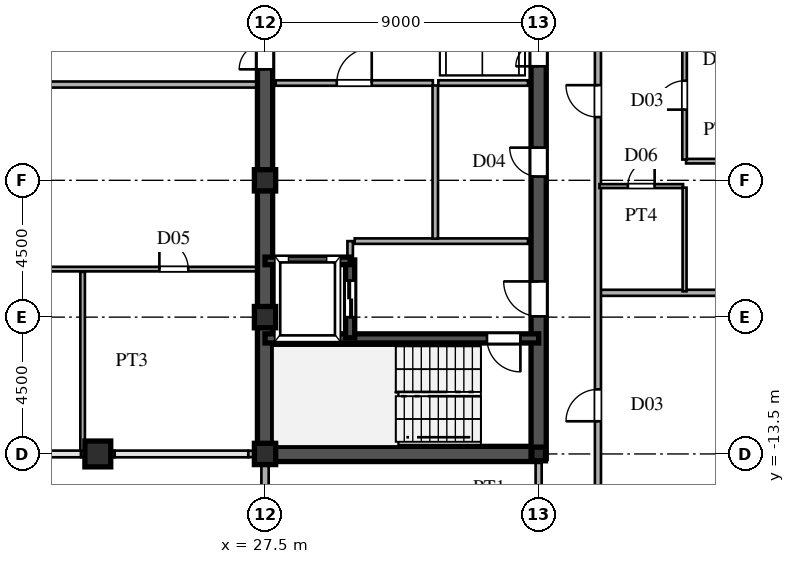
"""IFC4 building model, lengths in metres.
Left out: names, types, materials, properties, quantities, classifications, styles, units other than length and angle.
Written with IfcOpenShell. Run it as: python <this file> out.ifc"""

import sys

from ifc_helpers import new_model, si_unit, direction, frame, frame_2d, origin, origin_2d, place, context, subcontext, project, spatial, rectangle, hollow_rectangle, i_section, extrude, source, transform, mapped, element, fill, save


model = new_model("IFC4")
c1 = context("Model", 3, precision=1e-05, world=origin(), true_north=direction((0.0, 1.0)))
c2 = subcontext(c1, "Body", "Model", "MODEL_VIEW")
j1 = project(units=[si_unit("LENGTHUNIT", "METRE"), si_unit("PLANEANGLEUNIT", "RADIAN")], contexts=[c1])
p1 = place(None, origin())
s1 = spatial("IfcSite", under=j1, at=p1, CompositionType="ELEMENT")
p2 = place(p1, origin())
s2 = spatial("IfcBuilding", under=s1, at=p2, CompositionType="ELEMENT")
p3 = place(p2, frame((0.0, 0.0, 246.9)))
s3 = spatial("IfcBuildingStorey", under=s2, at=p3, CompositionType="ELEMENT", Elevation=246.9)
m1 = source(origin(), c2, "Body", "SweptSolid", [
    extrude(hollow_rectangle(XDim=0.7, YDim=0.7, WallThickness=0.03, at=origin_2d()), origin(), (0.0, 0.0, 1.0), 3.75),
])
for number, where, z_axis, x_axis in (
    (1, (27.5, -13.5, 0.0), (0.0, 0.0, 1.0), (1.0, 0.0, 0.0)),
    (2, (27.5, -9.0, 0.0), (0.0, 0.0, 1.0), (1.0, 0.0, 0.0)),
    (3, (27.5, -4.5, 0.0), (0.0, 0.0, 1.0), (1.0, 0.0, 0.0)),
):
    element("IfcColumn", number, at=place(p3, frame(where, z_axis=z_axis, x_axis=x_axis)), inside=s3, PredefinedType="COLUMN", context=c2, shape_type="MappedRepresentation", body=[
        mapped(m1, transform((0.0, 0.0, 0.0), scale=1.0)),
    ])
m2 = source(origin(), c2, "Body", "SweptSolid", [
    extrude(i_section(OverallWidth=0.45, OverallDepth=0.45, WebThickness=0.016, FlangeThickness=0.025, at=origin_2d()), origin(), (0.0, 0.0, 1.0), 3.75),
])
p4 = place(p3, frame((36.5, -13.5, 0.0), z_axis=(0.0, 0.0, 1.0), x_axis=(1.0, 0.0, 0.0)))
e4 = element("IfcColumn", 4, at=p4, inside=s3, PredefinedType="COLUMN", context=c2, shape_type="MappedRepresentation", body=[
    mapped(m2, transform((0.0, 0.0, 0.0), scale=1.0)),
])
m3 = source(origin(), c2, "Body", "SweptSolid", [
    extrude(hollow_rectangle(XDim=0.85, YDim=0.85, WallThickness=0.036, at=origin_2d()), origin(), (0.0, 0.0, 1.0), 3.75),
])
p5 = place(p3, frame((22.0, -13.5, 0.0), z_axis=(0.0, 0.0, 1.0), x_axis=(1.0, 0.0, 0.0)))
e5 = element("IfcColumn", 5, at=p5, inside=s3, PredefinedType="COLUMN", context=c2, shape_type="MappedRepresentation", body=[
    mapped(m3, transform((0.0, 0.0, 0.0), scale=1.0)),
])
p6 = place(p3, frame((27.5, -15.98, 0.0), z_axis=(0.0, 0.0, 1.0), x_axis=(0.0, 1.0, 0.0)))
e6 = element("IfcWall", 6, at=p6, inside=s3, PredefinedType="SOLIDWALL", context=c2, shape_type="SweptSolid", body=[
    extrude(rectangle(XDim=1.605, YDim=0.24, at=frame_2d((0.803, 0.0))), origin(), (0.0, 0.0, 1.0), 3.53),
])
p7 = place(p3, frame((27.5, -14.375, 0.0), z_axis=(0.0, 0.0, 1.0), x_axis=(0.0, 1.0, 0.0)))
e7 = element("IfcWall", 7, at=p7, inside=s3, PredefinedType="SOLIDWALL", context=c2, shape_type="SweptSolid", body=[
    extrude(rectangle(XDim=0.62, YDim=0.24, at=frame_2d((0.31, 0.0))), origin(), (0.0, 0.0, 1.0), 3.03),
])
p8 = place(p3, frame((21.45, -13.5, 0.0), z_axis=(0.0, 0.0, 1.0), x_axis=(1.0, 0.0, 0.0)))
e8 = element("IfcWall", 8, at=p8, inside=s3, PredefinedType="SOLIDWALL", context=c2, shape_type="SweptSolid", body=[
    extrude(rectangle(XDim=1.1, YDim=0.21, at=frame_2d((0.55, 0.0))), origin(), (0.0, 0.0, 1.0), 3.03),
])
p9 = place(p3, frame((26.95, -13.5, 0.0), z_axis=(0.0, 0.0, 1.0), x_axis=(1.0, 0.0, 0.0)))
e9 = element("IfcWall", 9, at=p9, inside=s3, PredefinedType="SOLIDWALL", context=c2, shape_type="SweptSolid", body=[
    extrude(rectangle(XDim=0.54, YDim=0.21, at=frame_2d((0.27, 0.0))), origin(), (0.0, 0.0, 1.0), 3.03),
])
p10 = place(p3, frame((27.5, -13.5, 0.0), z_axis=(0.0, 0.0, 1.0), x_axis=(0.0, 1.0, 0.0)))
e10 = element("IfcWall", 10, at=p10, inside=s3, PredefinedType="SHEAR", context=c2, shape_type="SweptSolid", body=[
    extrude(rectangle(XDim=12.2, YDim=0.5, at=frame_2d((6.1, 0.0))), origin(), (0.0, 0.0, 1.0), 3.53),
])
p11 = place(p3, frame((27.5, -1.3, 0.0), z_axis=(0.0, 0.0, 1.0), x_axis=(0.0, 1.0, 0.0)))
e11 = element("IfcWall", 11, at=p11, inside=s3, PredefinedType="SHEAR", context=c2, shape_type="SweptSolid", body=[
    extrude(rectangle(XDim=2.6, YDim=0.5, at=frame_2d((1.3, 0.0))), origin(), (0.0, 0.0, 1.0), 3.53),
])
p12 = place(p11, frame((0.45, 0.0, 0.0)))
e12 = element("IfcOpeningElement", 12, at=p12, cuts=e11, PredefinedType="OPENING", context=c2, shape_type="SweptSolid", body=[
    extrude(rectangle(XDim=1.7, YDim=2.35, at=frame_2d((0.85, 1.175))), frame((0.0, 0.26, 0.0), z_axis=(0.0, -1.0, 0.0), x_axis=(1.0, 0.0, 0.0)), (0.0, 0.0, 1.0), 0.52),
])
p13 = place(p3, frame((27.5, -13.5, 0.0), z_axis=(0.0, 0.0, 1.0), x_axis=(1.0, 0.0, 0.0)))
e13 = element("IfcWall", 13, at=p13, inside=s3, PredefinedType="SHEAR", context=c2, shape_type="SweptSolid", body=[
    extrude(rectangle(XDim=9.0, YDim=0.5, at=frame_2d((4.5, 0.0))), origin(), (0.0, 0.0, 1.0), 3.53),
])
p14 = place(p3, frame((36.5, -13.65, 0.0), z_axis=(0.0, 0.0, 1.0), x_axis=(0.0, 1.0, 0.0)))
e14 = element("IfcWall", 14, at=p14, inside=s3, PredefinedType="SHEAR", context=c2, shape_type="SweptSolid", body=[
    extrude(rectangle(XDim=7.15, YDim=0.5, at=frame_2d((3.575, 0.0))), origin(), (0.0, 0.0, 1.0), 3.53),
])
p15 = place(p14, frame((4.675, 0.0, 0.0)))
e15 = element("IfcOpeningElement", 15, at=p15, cuts=e14, PredefinedType="OPENING", context=c2, shape_type="SweptSolid", body=[
    extrude(rectangle(XDim=1.15, YDim=2.2, at=frame_2d((0.575, 1.1))), frame((0.0, 0.26, 0.0), z_axis=(0.0, -1.0, 0.0), x_axis=(1.0, 0.0, 0.0)), (0.0, 0.0, 1.0), 0.52),
])
p16 = place(p3, frame((36.5, -1.3, 0.0), z_axis=(0.0, 0.0, 1.0), x_axis=(0.0, 1.0, 0.0)))
e16 = element("IfcWall", 16, at=p16, inside=s3, PredefinedType="SHEAR", context=c2, shape_type="SweptSolid", body=[
    extrude(rectangle(XDim=2.6, YDim=0.5, at=frame_2d((1.3, 0.0))), origin(), (0.0, 0.0, 1.0), 3.53),
])
p17 = place(p16, frame((0.55, 0.0, 0.0)))
e17 = element("IfcOpeningElement", 17, at=p17, cuts=e16, PredefinedType="OPENING", context=c2, shape_type="SweptSolid", body=[
    extrude(rectangle(XDim=1.5, YDim=2.3, at=frame_2d((0.75, 1.15))), frame((0.0, 0.26, 0.0), z_axis=(0.0, -1.0, 0.0), x_axis=(1.0, 0.0, 0.0)), (0.0, 0.0, 1.0), 0.52),
])
p18 = place(p3, frame((36.5, -6.5, 0.0), z_axis=(0.0, 0.0, 1.0), x_axis=(0.0, 1.0, 0.0)))
e18 = element("IfcWall", 18, at=p18, inside=s3, PredefinedType="SHEAR", context=c2, shape_type="SweptSolid", body=[
    extrude(rectangle(XDim=5.2, YDim=0.5, at=frame_2d((2.6, 0.0))), origin(), (0.0, 0.0, 1.0), 3.53),
])
p19 = place(p18, frame((2.125, 0.0, 0.0)))
e19 = element("IfcOpeningElement", 19, at=p19, cuts=e18, PredefinedType="OPENING", context=c2, shape_type="SweptSolid", body=[
    extrude(rectangle(XDim=0.95, YDim=2.15, at=frame_2d((0.475, 1.075))), frame((0.0, 0.26, 0.0), z_axis=(0.0, -1.0, 0.0), x_axis=(1.0, 0.0, 0.0)), (0.0, 0.0, 1.0), 0.52),
])
p20 = place(p3, frame((27.5, -9.7, 0.0), z_axis=(0.0, 0.0, 1.0), x_axis=(1.0, 0.0, 0.0)))
e20 = element("IfcWall", 20, at=p20, inside=s3, PredefinedType="SHEAR", context=c2, shape_type="SweptSolid", body=[
    extrude(rectangle(XDim=9.0, YDim=0.3, at=frame_2d((4.5, 0.0))), origin(), (0.0, 0.0, 1.0), 3.53),
])
p21 = place(p20, frame((7.3, 0.0, 0.0)))
e21 = element("IfcOpeningElement", 21, at=p21, cuts=e20, PredefinedType="OPENING", context=c2, shape_type="SweptSolid", body=[
    extrude(rectangle(XDim=1.1, YDim=2.2, at=frame_2d((0.55, 1.1))), frame((0.0, 0.16, 0.0), z_axis=(0.0, -1.0, 0.0), x_axis=(1.0, 0.0, 0.0)), (0.0, 0.0, 1.0), 0.32),
])
p22 = place(p3, frame((27.5, -7.15, 0.0), z_axis=(0.0, 0.0, 1.0), x_axis=(1.0, 0.0, 0.0)))
e22 = element("IfcWall", 22, at=p22, inside=s3, PredefinedType="SHEAR", context=c2, shape_type="SweptSolid", body=[
    extrude(rectangle(XDim=2.8, YDim=0.25, at=frame_2d((1.4, 0.0))), origin(), (0.0, 0.0, 1.0), 3.53),
])
p23 = place(p3, frame((30.3, -9.68, 0.0), z_axis=(0.0, 0.0, 1.0), x_axis=(0.0, 1.0, 0.0)))
e23 = element("IfcWall", 23, at=p23, inside=s3, PredefinedType="SHEAR", context=c2, shape_type="SweptSolid", body=[
    extrude(rectangle(XDim=2.56, YDim=0.3, at=frame_2d((1.28, 0.0))), origin(), (0.0, 0.0, 1.0), 3.53),
])
p24 = place(p23, frame((0.68, 0.0, 0.0)))
e24 = element("IfcOpeningElement", 24, at=p24, cuts=e23, PredefinedType="OPENING", context=c2, shape_type="SweptSolid", body=[
    extrude(rectangle(XDim=1.2, YDim=2.25, at=frame_2d((0.6, 1.125))), frame((0.0, 0.16, 0.0), z_axis=(0.0, -1.0, 0.0), x_axis=(1.0, 0.0, 0.0)), (0.0, 0.0, 1.0), 0.32),
])
p25 = place(p3, frame((30.45, -6.5, 0.0), z_axis=(0.0, 0.0, 1.0), x_axis=(1.0, 0.0, 0.0)))
e25 = element("IfcWall", 25, at=p25, inside=s3, PredefinedType="PARTITIONING", context=c2, shape_type="SweptSolid", body=[
    extrude(rectangle(XDim=5.7, YDim=0.18, at=frame_2d((2.85, 0.0))), origin(), (0.0, 0.0, 1.0), 3.53),
])
p26 = place(p3, frame((30.3, -7.12, 0.0), z_axis=(0.0, 0.0, 1.0), x_axis=(0.0, 1.0, 0.0)))
e26 = element("IfcWall", 26, at=p26, inside=s3, PredefinedType="PARTITIONING", context=c2, shape_type="SweptSolid", body=[
    extrude(rectangle(XDim=0.62, YDim=0.18, at=frame_2d((0.31, 0.0))), origin(), (0.0, 0.0, 1.0), 3.53),
])
p27 = place(p3, frame((33.1, -6.42, 0.0), z_axis=(0.0, 0.0, 1.0), x_axis=(0.0, 1.0, 0.0)))
e27 = element("IfcWall", 27, at=p27, inside=s3, PredefinedType="PARTITIONING", context=c2, shape_type="SweptSolid", body=[
    extrude(rectangle(XDim=5.04, YDim=0.18, at=frame_2d((2.52, 0.0))), origin(), (0.0, 0.0, 1.0), 3.53),
])
p28 = place(p3, frame((27.85, -1.3, 0.0), z_axis=(0.0, 0.0, 1.0), x_axis=(1.0, 0.0, 0.0)))
e28 = element("IfcWall", 28, at=p28, inside=s3, PredefinedType="PARTITIONING", context=c2, shape_type="SweptSolid", body=[
    extrude(rectangle(XDim=5.17, YDim=0.18, at=frame_2d((2.585, 0.0))), origin(), (0.0, 0.0, 1.0), 3.53),
])
p29 = place(p28, frame((2.01, 0.0, 0.0)))
e29 = element("IfcOpeningElement", 29, at=p29, cuts=e28, PredefinedType="OPENING", context=c2, shape_type="SweptSolid", body=[
    extrude(rectangle(XDim=1.15, YDim=2.2, at=frame_2d((0.575, 1.1))), frame((0.0, 0.1, 0.0), z_axis=(0.0, -1.0, 0.0), x_axis=(1.0, 0.0, 0.0)), (0.0, 0.0, 1.0), 0.2),
])
p30 = place(p3, frame((33.2, -1.3, 0.0), z_axis=(0.0, 0.0, 1.0), x_axis=(1.0, 0.0, 0.0)))
e30 = element("IfcWall", 30, at=p30, inside=s3, PredefinedType="PARTITIONING", context=c2, shape_type="SweptSolid", body=[
    extrude(rectangle(XDim=2.95, YDim=0.18, at=frame_2d((1.475, 0.0))), origin(), (0.0, 0.0, 1.0), 3.53),
])
p31 = place(p3, frame((38.53, -8.2, 0.0), z_axis=(0.0, 0.0, 1.0), x_axis=(1.0, 0.0, 0.0)))
e31 = element("IfcWall", 31, at=p31, inside=s3, PredefinedType="PARTITIONING", context=c2, shape_type="SweptSolid", body=[
    extrude(rectangle(XDim=17.813, YDim=0.2, at=frame_2d((8.906, 0.0))), origin(), (0.0, 0.0, 1.0), 3.53),
])
p32 = place(p3, frame((7.085, -7.42, 0.0), z_axis=(0.0, 0.0, 1.0), x_axis=(1.0, 0.0, 0.0)))
e32 = element("IfcWall", 32, at=p32, inside=s3, PredefinedType="PARTITIONING", context=c2, shape_type="SweptSolid", body=[
    extrude(rectangle(XDim=20.16, YDim=0.15, at=frame_2d((10.08, 0.0))), origin(), (0.0, 0.0, 1.0), 3.53),
])
p33 = place(p32, frame((3.44, 0.0, 0.0)))
e33 = element("IfcOpeningElement", 33, at=p33, cuts=e32, PredefinedType="OPENING", context=c2, shape_type="SweptSolid", body=[
    extrude(rectangle(XDim=0.95, YDim=2.15, at=frame_2d((0.475, 1.075))), frame((0.0, 0.085, 0.0), z_axis=(0.0, -1.0, 0.0), x_axis=(1.0, 0.0, 0.0)), (0.0, 0.0, 1.0), 0.17),
])
p34 = place(p32, frame((10.69, 0.0, 0.0)))
e34 = element("IfcOpeningElement", 34, at=p34, cuts=e32, PredefinedType="OPENING", context=c2, shape_type="SweptSolid", body=[
    extrude(rectangle(XDim=0.95, YDim=2.15, at=frame_2d((0.475, 1.075))), frame((0.0, 0.085, 0.0), z_axis=(0.0, -1.0, 0.0), x_axis=(1.0, 0.0, 0.0)), (0.0, 0.0, 1.0), 0.17),
])
p35 = place(p32, frame((16.94, 0.0, 0.0)))
e35 = element("IfcOpeningElement", 35, at=p35, cuts=e32, PredefinedType="OPENING", context=c2, shape_type="SweptSolid", body=[
    extrude(rectangle(XDim=0.95, YDim=2.15, at=frame_2d((0.475, 1.075))), frame((0.0, 0.085, 0.0), z_axis=(0.0, -1.0, 0.0), x_axis=(1.0, 0.0, 0.0)), (0.0, 0.0, 1.0), 0.17),
])
p36 = place(p3, frame((38.5, -4.69, 0.0), z_axis=(0.0, 0.0, 1.0), x_axis=(1.0, 0.0, 0.0)))
e36 = element("IfcWall", 36, at=p36, inside=s3, PredefinedType="PARTITIONING", context=c2, shape_type="SweptSolid", body=[
    extrude(rectangle(XDim=2.75, YDim=0.13, at=frame_2d((1.375, 0.0))), origin(), (0.0, 0.0, 1.0), 3.53),
])
p37 = place(p36, frame((0.935, 0.0, 0.0)))
e37 = element("IfcOpeningElement", 37, at=p37, cuts=e36, PredefinedType="OPENING", context=c2, shape_type="SweptSolid", body=[
    extrude(rectangle(XDim=0.88, YDim=2.1, at=frame_2d((0.44, 1.05))), frame((0.0, 0.075, 0.0), z_axis=(0.0, -1.0, 0.0), x_axis=(1.0, 0.0, 0.0)), (0.0, 0.0, 1.0), 0.15),
])
p38 = place(p3, frame((41.35, -3.87, 0.0), z_axis=(0.0, 0.0, 1.0), x_axis=(1.0, 0.0, 0.0)))
e38 = element("IfcWall", 38, at=p38, inside=s3, PredefinedType="PARTITIONING", context=c2, shape_type="SweptSolid", body=[
    extrude(rectangle(XDim=22.24, YDim=0.15, at=frame_2d((11.12, 0.0))), origin(), (0.0, 0.0, 1.0), 3.53),
])
p39 = place(p38, frame((2.775, 0.0, 0.0)))
e39 = element("IfcOpeningElement", 39, at=p39, cuts=e38, PredefinedType="OPENING", context=c2, shape_type="SweptSolid", body=[
    extrude(rectangle(XDim=0.95, YDim=2.15, at=frame_2d((0.475, 1.075))), frame((0.0, 0.085, 0.0), z_axis=(0.0, -1.0, 0.0), x_axis=(1.0, 0.0, 0.0)), (0.0, 0.0, 1.0), 0.17),
])
p40 = place(p3, frame((-27.245, -1.35, 0.0), z_axis=(0.0, 0.0, 1.0), x_axis=(1.0, 0.0, 0.0)))
e40 = element("IfcWall", 40, at=p40, inside=s3, PredefinedType="PARTITIONING", context=c2, shape_type="SweptSolid", body=[
    extrude(rectangle(XDim=54.49, YDim=0.2, at=frame_2d((27.245, 0.0))), origin(), (0.0, 0.0, 1.0), 3.53),
])
p41 = place(p40, frame((24.97, 0.0, 0.0)))
e41 = element("IfcOpeningElement", 41, at=p41, cuts=e40, PredefinedType="OPENING", context=c2, shape_type="SweptSolid", body=[
    extrude(rectangle(XDim=1.05, YDim=2.25, at=frame_2d((0.525, 1.125))), frame((0.0, 0.11, 0.0), z_axis=(0.0, -1.0, 0.0), x_axis=(1.0, 0.0, 0.0)), (0.0, 0.0, 1.0), 0.22),
])
p42 = place(p3, frame((21.5, -13.39, 0.0), z_axis=(0.0, 0.0, 1.0), x_axis=(0.0, 1.0, 0.0)))
e42 = element("IfcWall", 42, at=p42, inside=s3, PredefinedType="PARTITIONING", context=c2, shape_type="SweptSolid", body=[
    extrude(rectangle(XDim=5.88, YDim=0.15, at=frame_2d((2.94, 0.0))), origin(), (0.0, 0.0, 1.0), 3.53),
])
p43 = place(p3, frame((36.5, -15.515, 0.0), z_axis=(0.0, 0.0, 1.0), x_axis=(0.0, 1.0, 0.0)))
e43 = element("IfcWall", 43, at=p43, inside=s3, PredefinedType="PARTITIONING", context=c2, shape_type="SweptSolid", body=[
    extrude(rectangle(XDim=1.76, YDim=0.2, at=frame_2d((0.88, 0.0))), origin(), (0.0, 0.0, 1.0), 2.93),
])
p44 = place(p3, frame((38.45, -15.515, 0.0), z_axis=(0.0, 0.0, 1.0), x_axis=(0.0, 1.0, 0.0)))
e44 = element("IfcWall", 44, at=p44, inside=s3, PredefinedType="PARTITIONING", context=c2, shape_type="SweptSolid", body=[
    extrude(rectangle(XDim=31.03, YDim=0.2, at=frame_2d((15.515, 0.0))), origin(), (0.0, 0.0, 1.0), 3.53),
])
p45 = place(p44, frame((3.09, 0.0, 0.0)))
e45 = element("IfcOpeningElement", 45, at=p45, cuts=e44, PredefinedType="OPENING", context=c2, shape_type="SweptSolid", body=[
    extrude(rectangle(XDim=1.05, YDim=2.25, at=frame_2d((0.525, 1.125))), frame((0.0, 0.11, 0.0), z_axis=(0.0, -1.0, 0.0), x_axis=(1.0, 0.0, 0.0)), (0.0, 0.0, 1.0), 0.22),
])
p46 = place(p44, frame((13.095, 0.0, 0.0)))
e46 = element("IfcOpeningElement", 46, at=p46, cuts=e44, PredefinedType="OPENING", context=c2, shape_type="SweptSolid", body=[
    extrude(rectangle(XDim=1.05, YDim=2.25, at=frame_2d((0.525, 1.125))), frame((0.0, 0.11, 0.0), z_axis=(0.0, -1.0, 0.0), x_axis=(1.0, 0.0, 0.0)), (0.0, 0.0, 1.0), 0.22),
])
p47 = place(p44, frame((25.19, 0.0, 0.0)))
e47 = element("IfcOpeningElement", 47, at=p47, cuts=e44, PredefinedType="OPENING", context=c2, shape_type="SweptSolid", body=[
    extrude(rectangle(XDim=1.05, YDim=2.25, at=frame_2d((0.525, 1.125))), frame((0.0, 0.11, 0.0), z_axis=(0.0, -1.0, 0.0), x_axis=(1.0, 0.0, 0.0)), (0.0, 0.0, 1.0), 0.22),
])
p48 = place(p3, frame((41.3, -8.15, 0.0), z_axis=(0.0, 0.0, 1.0), x_axis=(0.0, 1.0, 0.0)))
e48 = element("IfcWall", 48, at=p48, inside=s3, PredefinedType="PARTITIONING", context=c2, shape_type="SweptSolid", body=[
    extrude(rectangle(XDim=3.408, YDim=0.13, at=frame_2d((1.704, 0.0))), origin(), (0.0, 0.0, 1.0), 3.53),
])
p49 = place(p3, frame((41.3, -3.817, 0.0), z_axis=(0.0, 0.0, 1.0), x_axis=(0.0, 1.0, 0.0)))
e49 = element("IfcWall", 49, at=p49, inside=s3, PredefinedType="PARTITIONING", context=c2, shape_type="SweptSolid", body=[
    extrude(rectangle(XDim=4.234, YDim=0.15, at=frame_2d((2.117, 0.0))), origin(), (0.0, 0.0, 1.0), 3.53),
])
p50 = place(p49, frame((1.642, 0.0, 0.0)))
e50 = element("IfcOpeningElement", 50, at=p50, cuts=e49, PredefinedType="OPENING", context=c2, shape_type="SweptSolid", body=[
    extrude(rectangle(XDim=0.95, YDim=2.15, at=frame_2d((0.475, 1.075))), frame((0.0, 0.085, 0.0), z_axis=(0.0, -1.0, 0.0), x_axis=(1.0, 0.0, 0.0)), (0.0, 0.0, 1.0), 0.17),
])
m4 = source(origin(), c2, "Body", "SweptSolid", [
    extrude(rectangle(XDim=1.7, YDim=2.35, at=frame_2d((0.85, 1.175))), frame((0.0, 0.025, 0.0), z_axis=(0.0, -1.0, 0.0), x_axis=(1.0, 0.0, 0.0)), (0.0, 0.0, 1.0), 0.05),
])
p51 = place(p12, origin())
e51 = element("IfcDoor", 51, at=p51, inside=s3, OperationType="DOUBLE_SWING_LEFT", PredefinedType="DOOR", context=c2, shape_type="MappedRepresentation", body=[
    mapped(m4, transform((0.0, 0.0, 0.0), scale=1.0)),
])
fill(e12, e51)
m5 = source(origin(), c2, "Body", "SweptSolid", [
    extrude(rectangle(XDim=1.15, YDim=2.2, at=frame_2d((0.575, 1.1))), frame((0.0, 0.025, 0.0), z_axis=(0.0, -1.0, 0.0), x_axis=(1.0, 0.0, 0.0)), (0.0, 0.0, 1.0), 0.05),
])
p52 = place(p15, origin())
e52 = element("IfcDoor", 52, at=p52, inside=s3, OperationType="SINGLE_SWING_RIGHT", PredefinedType="DOOR", context=c2, shape_type="MappedRepresentation", body=[
    mapped(m5, transform((0.0, 0.0, 0.0), scale=1.0)),
])
fill(e15, e52)
m6 = source(origin(), c2, "Body", "SweptSolid", [
    extrude(rectangle(XDim=1.5, YDim=2.3, at=frame_2d((0.75, 1.15))), frame((0.0, 0.025, 0.0), z_axis=(0.0, -1.0, 0.0), x_axis=(1.0, 0.0, 0.0)), (0.0, 0.0, 1.0), 0.05),
])
p53 = place(p17, origin())
e53 = element("IfcDoor", 53, at=p53, inside=s3, OperationType="DOUBLE_SWING_LEFT", PredefinedType="DOOR", context=c2, shape_type="MappedRepresentation", body=[
    mapped(m6, transform((0.0, 0.0, 0.0), scale=1.0)),
])
fill(e17, e53)
m7 = source(origin(), c2, "Body", "SweptSolid", [
    extrude(rectangle(XDim=0.95, YDim=2.15, at=frame_2d((0.475, 1.075))), frame((0.0, 0.025, 0.0), z_axis=(0.0, -1.0, 0.0), x_axis=(1.0, 0.0, 0.0)), (0.0, 0.0, 1.0), 0.05),
])
p54 = place(p19, origin())
e54 = element("IfcDoor", 54, at=p54, inside=s3, OperationType="SINGLE_SWING_RIGHT", PredefinedType="DOOR", context=c2, shape_type="MappedRepresentation", body=[
    mapped(m7, transform((0.0, 0.0, 0.0), scale=1.0)),
])
fill(e19, e54)
m8 = source(origin(), c2, "Body", "SweptSolid", [
    extrude(rectangle(XDim=1.1, YDim=2.2, at=frame_2d((0.55, 1.1))), frame((0.0, 0.025, 0.0), z_axis=(0.0, -1.0, 0.0), x_axis=(1.0, 0.0, 0.0)), (0.0, 0.0, 1.0), 0.05),
])
p55 = place(p21, frame((1.1, 0.0, 0.0), z_axis=(0.0, 0.0, 1.0), x_axis=(-1.0, 0.0, 0.0)))
e55 = element("IfcDoor", 55, at=p55, inside=s3, OperationType="SINGLE_SWING_RIGHT", PredefinedType="DOOR", context=c2, shape_type="MappedRepresentation", body=[
    mapped(m8, transform((0.0, 0.0, 0.0), scale=1.0)),
])
fill(e21, e55)
m9 = source(origin(), c2, "Body", "SweptSolid", [
    extrude(rectangle(XDim=1.2, YDim=2.25, at=frame_2d((0.6, 1.125))), frame((0.0, 0.025, 0.0), z_axis=(0.0, -1.0, 0.0), x_axis=(1.0, 0.0, 0.0)), (0.0, 0.0, 1.0), 0.05),
])
p56 = place(p24, origin())
e56 = element("IfcDoor", 56, at=p56, inside=s3, OperationType="DOUBLE_DOOR_SLIDING", PredefinedType="DOOR", context=c2, shape_type="MappedRepresentation", body=[
    mapped(m9, transform((0.0, 0.0, 0.0), scale=1.0)),
])
fill(e24, e56)
p57 = place(p29, origin())
e57 = element("IfcDoor", 57, at=p57, inside=s3, OperationType="SINGLE_SWING_RIGHT", PredefinedType="DOOR", context=c2, shape_type="MappedRepresentation", body=[
    mapped(m5, transform((0.0, 0.0, 0.0), scale=1.0)),
])
fill(e29, e57)
m10 = source(origin(), c2, "Body", "SweptSolid", [
    extrude(rectangle(XDim=0.95, YDim=2.15, at=frame_2d((0.475, 1.075))), frame((0.0, 0.025, 0.0), z_axis=(0.0, -1.0, 0.0), x_axis=(1.0, 0.0, 0.0)), (0.0, 0.0, 1.0), 0.05),
])
p58 = place(p35, origin())
e58 = element("IfcDoor", 58, at=p58, inside=s3, OperationType="SINGLE_SWING_LEFT", PredefinedType="DOOR", context=c2, shape_type="MappedRepresentation", body=[
    mapped(m10, transform((0.0, 0.0, 0.0), scale=1.0)),
])
fill(e35, e58)
m11 = source(origin(), c2, "Body", "SweptSolid", [
    extrude(rectangle(XDim=0.88, YDim=2.1, at=frame_2d((0.44, 1.05))), frame((0.0, 0.025, 0.0), z_axis=(0.0, -1.0, 0.0), x_axis=(1.0, 0.0, 0.0)), (0.0, 0.0, 1.0), 0.05),
])
p59 = place(p37, origin())
e59 = element("IfcDoor", 59, at=p59, inside=s3, OperationType="SINGLE_SWING_RIGHT", PredefinedType="DOOR", context=c2, shape_type="MappedRepresentation", body=[
    mapped(m11, transform((0.0, 0.0, 0.0), scale=1.0)),
])
fill(e37, e59)
m12 = source(origin(), c2, "Body", "SweptSolid", [
    extrude(rectangle(XDim=1.05, YDim=2.25, at=frame_2d((0.525, 1.125))), frame((0.0, 0.025, 0.0), z_axis=(0.0, -1.0, 0.0), x_axis=(1.0, 0.0, 0.0)), (0.0, 0.0, 1.0), 0.05),
])
p60 = place(p45, origin())
e60 = element("IfcDoor", 60, at=p60, inside=s3, OperationType="SINGLE_SWING_LEFT", PredefinedType="DOOR", context=c2, shape_type="MappedRepresentation", body=[
    mapped(m12, transform((0.0, 0.0, 0.0), scale=1.0)),
])
fill(e45, e60)
p61 = place(p46, origin())
e61 = element("IfcDoor", 61, at=p61, inside=s3, OperationType="SINGLE_SWING_RIGHT", PredefinedType="DOOR", context=c2, shape_type="MappedRepresentation", body=[
    mapped(m12, transform((0.0, 0.0, 0.0), scale=1.0)),
])
fill(e46, e61)
p62 = place(p50, origin())
e62 = element("IfcDoor", 62, at=p62, inside=s3, OperationType="SINGLE_SWING_LEFT", PredefinedType="DOOR", context=c2, shape_type="MappedRepresentation", body=[
    mapped(m10, transform((0.0, 0.0, 0.0), scale=1.0)),
])
fill(e50, e62)
save(model, sys.argv[1])
